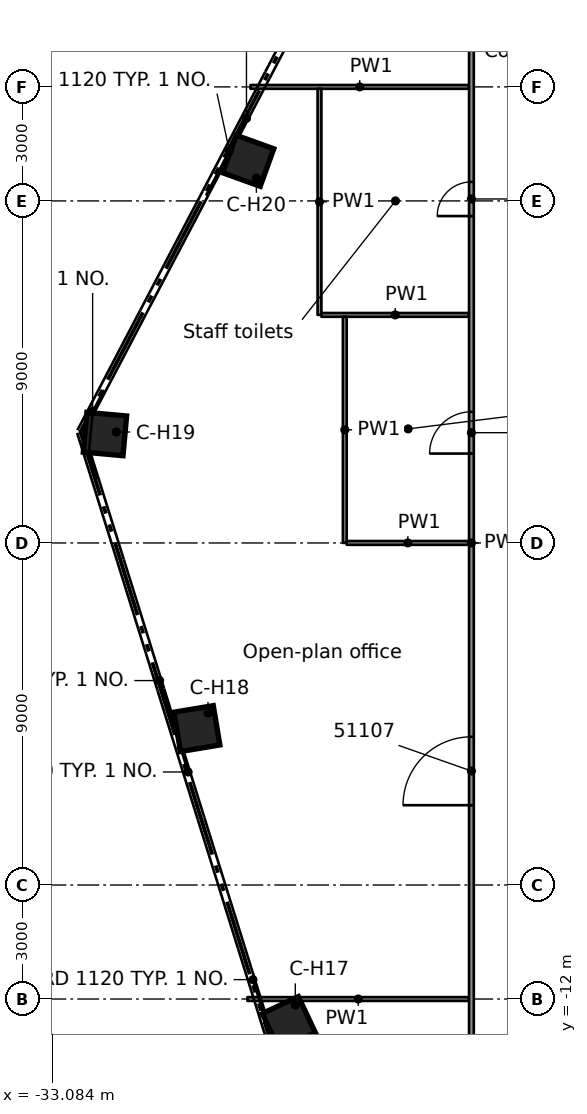
"""IFC4 building model, lengths in metres.
Left out: names, types, materials, properties, quantities, classifications, styles, units other than length and angle.
Written with IfcOpenShell. Run it as: python <this file> out.ifc"""

import sys

from ifc_helpers import new_model, si_unit, direction, frame, frame_2d, origin, origin_2d, place, context, subcontext, project, spatial, rectangle, extrude, element, fill, save


model = new_model("IFC4")
c1 = context("Model", 3, precision=1e-05, world=origin(), true_north=direction((0.0, 1.0)))
c2 = subcontext(c1, "Body", "Model", "MODEL_VIEW")
j1 = project(units=[si_unit("LENGTHUNIT", "METRE"), si_unit("PLANEANGLEUNIT", "RADIAN")], contexts=[c1])
p1 = place(None, origin())
s1 = spatial("IfcSite", under=j1, at=p1, CompositionType="ELEMENT")
p2 = place(p1, origin())
s2 = spatial("IfcBuilding", under=s1, at=p2, CompositionType="ELEMENT")
p3 = place(p2, frame((0.0, 0.0, 253.5)))
s3 = spatial("IfcBuildingStorey", under=s2, at=p3, CompositionType="ELEMENT", Elevation=253.5)
for number, where, z_axis, x_axis in (
    (1, (-26.855, -12.634, 0.0), (0.0, 0.0, 1.0), (-0.905, -0.426, 0.0)),
    (2, (-29.274, -4.884, 0.0), (0.0, 0.0, 1.0), (-0.986, -0.165, 0.0)),
    (3, (-31.693, 2.866, 0.0), (0.0, 0.0, 1.0), (-0.996, 0.09, 0.0)),
    (4, (-27.923, 10.056, 0.0), (0.0, 0.0, 1.0), (-0.941, 0.339, 0.0)),
):
    element("IfcColumn", number, at=place(p3, frame(where, z_axis=z_axis, x_axis=x_axis)), inside=s3, PredefinedType="COLUMN", context=c2, shape_type="SweptSolid", body=[
        extrude(rectangle(XDim=1.05, YDim=1.05, at=origin_2d()), origin(), (0.0, 0.0, 1.0), 3.5),
    ])
p4 = place(p3, frame((-27.944, -12.0, 0.0), z_axis=(0.0, 0.0, 1.0), x_axis=(1.0, 0.0, 0.0)))
e5 = element("IfcWall", 5, at=p4, inside=s3, PredefinedType="PARTITIONING", context=c2, shape_type="SweptSolid", body=[
    extrude(rectangle(XDim=5.831, YDim=0.1, at=frame_2d((2.916, 0.0))), origin(), (0.0, 0.0, 1.0), 3.08),
])
p5 = place(p3, frame((-25.331, 0.001, 0.0), z_axis=(0.0, 0.0, 1.0), x_axis=(1.0, 0.0, 0.0)))
e6 = element("IfcWall", 6, at=p5, inside=s3, PredefinedType="PARTITIONING", context=c2, shape_type="SweptSolid", body=[
    extrude(rectangle(XDim=3.218, YDim=0.1, at=frame_2d((1.609, 0.0))), origin(), (0.0, 0.0, 1.0), 3.08),
])
p6 = place(p3, frame((-25.998, 6.001, 0.0), z_axis=(0.0, 0.0, 1.0), x_axis=(1.0, 0.0, 0.0)))
e7 = element("IfcWall", 7, at=p6, inside=s3, PredefinedType="PARTITIONING", context=c2, shape_type="SweptSolid", body=[
    extrude(rectangle(XDim=3.885, YDim=0.1, at=frame_2d((1.942, 0.0))), origin(), (0.0, 0.0, 1.0), 3.08),
])
p7 = place(p3, frame((-27.864, 12.0, 0.0), z_axis=(0.0, 0.0, 1.0), x_axis=(1.0, 0.0, 0.0)))
e8 = element("IfcWall", 8, at=p7, inside=s3, PredefinedType="PARTITIONING", context=c2, shape_type="SweptSolid", body=[
    extrude(rectangle(XDim=5.751, YDim=0.1, at=frame_2d((2.875, 0.0))), origin(), (0.0, 0.0, 1.0), 3.08),
])
p8 = place(p3, frame((-22.05, -15.051, 0.0), z_axis=(0.0, 0.0, 1.0), x_axis=(0.0, 1.0, 0.0)))
e9 = element("IfcWall", 9, at=p8, inside=s3, PredefinedType="PARTITIONING", context=c2, shape_type="SweptSolid", body=[
    extrude(rectangle(XDim=30.102, YDim=0.125, at=frame_2d((15.051, 0.0))), origin(), (0.0, 0.0, 1.0), 3.08),
])
p9 = place(p8, frame((8.151, 0.0, 0.0)))
e10 = element("IfcOpeningElement", 10, at=p9, cuts=e9, PredefinedType="OPENING", context=c2, shape_type="SweptSolid", body=[
    extrude(rectangle(XDim=1.8, YDim=2.1, at=frame_2d((0.9, 1.05))), frame((0.0, 0.073, 0.0), z_axis=(0.0, -1.0, 0.0), x_axis=(1.0, 0.0, 0.0)), (0.0, 0.0, 1.0), 0.145),
])
p10 = place(p8, frame((23.652, 0.0, 0.0)))
e11 = element("IfcOpeningElement", 11, at=p10, cuts=e9, PredefinedType="OPENING", context=c2, shape_type="SweptSolid", body=[
    extrude(rectangle(XDim=0.9, YDim=2.1, at=frame_2d((0.45, 1.05))), frame((0.0, 0.073, 0.0), z_axis=(0.0, -1.0, 0.0), x_axis=(1.0, 0.0, 0.0)), (0.0, 0.0, 1.0), 0.145),
])
p11 = place(p8, frame((17.403, 0.0, 0.0)))
e12 = element("IfcOpeningElement", 12, at=p11, cuts=e9, PredefinedType="OPENING", context=c2, shape_type="SweptSolid", body=[
    extrude(rectangle(XDim=1.1, YDim=2.1, at=frame_2d((0.55, 1.05))), frame((0.0, 0.073, 0.0), z_axis=(0.0, -1.0, 0.0), x_axis=(1.0, 0.0, 0.0)), (0.0, 0.0, 1.0), 0.145),
])
for number, where, z_axis, x_axis in (
    (13, (-25.382, 0.002, 0.0), (0.0, 0.0, 1.0), (0.0, 1.0, 0.0)),
    (14, (-26.048, 6.001, 0.0), (0.0, 0.0, 1.0), (0.0, 1.0, 0.0)),
):
    element("IfcWall", number, at=place(p3, frame(where, z_axis=z_axis, x_axis=x_axis)), inside=s3, PredefinedType="PARTITIONING", context=c2, shape_type="SweptSolid", body=[
        extrude(rectangle(XDim=5.949, YDim=0.1, at=frame_2d((2.975, 0.0))), origin(), (0.0, 0.0, 1.0), 3.08),
    ])
p12 = place(p9, origin())
e15 = element("IfcDoor", 15, at=p12, inside=s3, OperationType="DOUBLE_DOOR_SINGLE_SWING", PredefinedType="DOOR", context=c2, shape_type="SweptSolid", body=[
    extrude(rectangle(XDim=1.8, YDim=2.1, at=frame_2d((0.9, 1.05))), frame((0.0, 0.025, 0.0), z_axis=(0.0, -1.0, 0.0), x_axis=(1.0, 0.0, 0.0)), (0.0, 0.0, 1.0), 0.05),
])
fill(e10, e15)
p13 = place(p10, origin())
e16 = element("IfcDoor", 16, at=p13, inside=s3, OperationType="SINGLE_SWING_RIGHT", PredefinedType="DOOR", context=c2, shape_type="SweptSolid", body=[
    extrude(rectangle(XDim=0.9, YDim=2.1, at=frame_2d((0.45, 1.05))), frame((0.0, 0.025, 0.0), z_axis=(0.0, -1.0, 0.0), x_axis=(1.0, 0.0, 0.0)), (0.0, 0.0, 1.0), 0.05),
])
fill(e11, e16)
p14 = place(p11, origin())
e17 = element("IfcDoor", 17, at=p14, inside=s3, OperationType="SINGLE_SWING_RIGHT", PredefinedType="DOOR", context=c2, shape_type="SweptSolid", body=[
    extrude(rectangle(XDim=1.1, YDim=2.1, at=frame_2d((0.55, 1.05))), frame((0.0, 0.025, 0.0), z_axis=(0.0, -1.0, 0.0), x_axis=(1.0, 0.0, 0.0)), (0.0, 0.0, 1.0), 0.05),
])
fill(e12, e17)
save(model, sys.argv[1])
